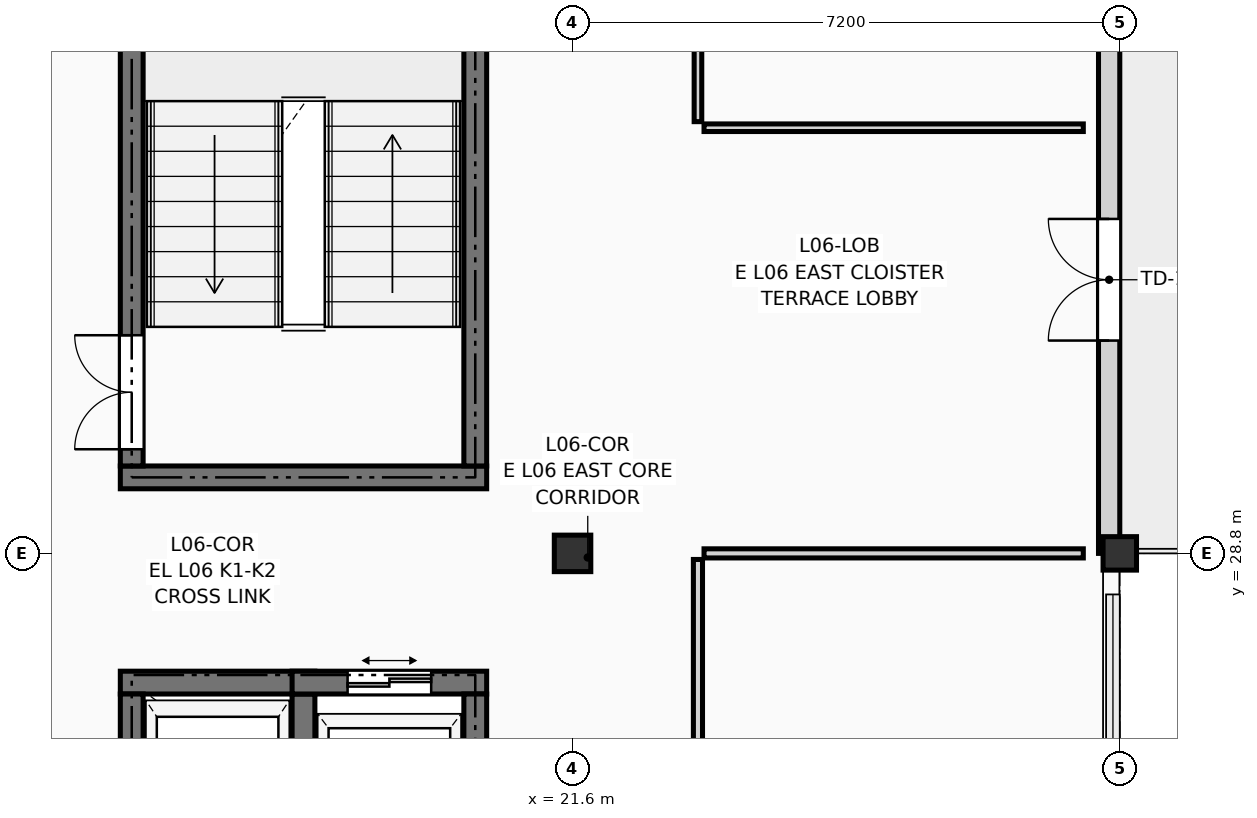
"""IFC4 building model, lengths in metres.
Left out: names, types, materials, properties, quantities, classifications, styles, units other than length and angle.
Written with IfcOpenShell. Run it as: python <this file> out.ifc"""

import sys

from ifc_helpers import new_model, si_unit, direction, frame, frame_2d, origin, origin_2d, place, context, subcontext, project, spatial, rectangle, extrude, element, fill, save


model = new_model("IFC4")
c1 = context("Model", 3, precision=1e-05, world=origin(), true_north=direction((0.0, 1.0)))
c2 = subcontext(c1, "Body", "Model", "MODEL_VIEW")
j1 = project(units=[si_unit("LENGTHUNIT", "METRE"), si_unit("PLANEANGLEUNIT", "RADIAN")], contexts=[c1])
p1 = place(None, origin())
s1 = spatial("IfcSite", under=j1, at=p1, CompositionType="ELEMENT")
p2 = place(p1, origin())
s2 = spatial("IfcBuilding", under=s1, at=p2, CompositionType="ELEMENT")
p3 = place(p2, frame((0.0, 0.0, 22.95)))
s3 = spatial("IfcBuildingStorey", under=s2, at=p3, CompositionType="ELEMENT", Elevation=22.95)
p4 = place(p3, frame((21.6, 28.8, 0.0), z_axis=(0.0, 0.0, 1.0), x_axis=(1.0, 0.0, 0.0)))
e1 = element("IfcColumn", 1, at=p4, inside=s3, PredefinedType="COLUMN", context=c2, shape_type="SweptSolid", body=[
    extrude(rectangle(XDim=0.48, YDim=0.48, at=origin_2d()), origin(), (0.0, 0.0, 1.0), 3.3),
])
p5 = place(p3, frame((28.8, 28.8, 0.0), z_axis=(0.0, 0.0, 1.0), x_axis=(1.0, 0.0, 0.0)))
e2 = element("IfcColumn", 2, at=p5, inside=s3, PredefinedType="COLUMN", context=c2, shape_type="SweptSolid", body=[
    extrude(rectangle(XDim=0.44, YDim=0.44, at=origin_2d()), origin(), (0.0, 0.0, 1.0), 3.3),
])
p6 = place(p3, frame((28.66, 28.8, 0.0), z_axis=(0.0, 0.0, 1.0), x_axis=(0.0, 1.0, 0.0)))
e3 = element("IfcWall", 3, at=p6, inside=s3, PredefinedType="SOLIDWALL", context=c2, shape_type="SweptSolid", body=[
    extrude(rectangle(XDim=7.2, YDim=0.28, at=frame_2d((3.6, 0.0))), origin(), (0.0, 0.0, 1.0), 2.54),
])
p7 = place(p6, frame((2.8, 0.0, 0.0)))
e4 = element("IfcOpeningElement", 4, at=p7, cuts=e3, PredefinedType="OPENING", context=c2, shape_type="SweptSolid", body=[
    extrude(rectangle(XDim=1.6, YDim=2.25, at=frame_2d((0.8, 1.125))), frame((0.0, 0.152, 0.0), z_axis=(0.0, -1.0, 0.0), x_axis=(1.0, 0.0, 0.0)), (0.0, 0.0, 1.0), 0.304),
])
p8 = place(p3, frame((15.65, 29.8, 0.0), z_axis=(0.0, 0.0, 1.0), x_axis=(1.0, 0.0, 0.0)))
e5 = element("IfcWall", 5, at=p8, inside=s3, PredefinedType="SHEAR", context=c2, shape_type="SweptSolid", body=[
    extrude(rectangle(XDim=4.82, YDim=0.3, at=frame_2d((2.41, 0.0))), origin(), (0.0, 0.0, 1.0), 3.09),
])
p9 = place(p3, frame((15.8, 29.95, 0.0), z_axis=(0.0, 0.0, 1.0), x_axis=(0.0, 1.0, 0.0)))
e6 = element("IfcWall", 6, at=p9, inside=s3, PredefinedType="SHEAR", context=c2, shape_type="SweptSolid", body=[
    extrude(rectangle(XDim=7.7, YDim=0.3, at=frame_2d((3.85, 0.0))), origin(), (0.0, 0.0, 1.0), 3.09),
])
p10 = place(p9, frame((0.22, 0.0, 0.0)))
e7 = element("IfcOpeningElement", 7, at=p10, cuts=e6, PredefinedType="OPENING", context=c2, shape_type="SweptSolid", body=[
    extrude(rectangle(XDim=1.5, YDim=2.2, at=frame_2d((0.75, 1.1))), frame((0.0, 0.162, 0.0), z_axis=(0.0, -1.0, 0.0), x_axis=(1.0, 0.0, 0.0)), (0.0, 0.0, 1.0), 0.324),
])
p11 = place(p3, frame((20.32, 29.95, 0.0), z_axis=(0.0, 0.0, 1.0), x_axis=(0.0, 1.0, 0.0)))
e8 = element("IfcWall", 8, at=p11, inside=s3, PredefinedType="SHEAR", context=c2, shape_type="SweptSolid", body=[
    extrude(rectangle(XDim=7.7, YDim=0.3, at=frame_2d((3.85, 0.0))), origin(), (0.0, 0.0, 1.0), 3.09),
])
p12 = place(p3, frame((15.65, 27.1, 0.0), z_axis=(0.0, 0.0, 1.0), x_axis=(1.0, 0.0, 0.0)))
e9 = element("IfcWall", 9, at=p12, inside=s3, PredefinedType="SHEAR", context=c2, shape_type="SweptSolid", body=[
    extrude(rectangle(XDim=2.56, YDim=0.3, at=frame_2d((1.28, 0.0))), origin(), (0.0, 0.0, 1.0), 3.09),
])
p13 = place(p3, frame((15.8, 23.98, 0.0), z_axis=(0.0, 0.0, 1.0), x_axis=(0.0, 1.0, 0.0)))
e10 = element("IfcWall", 10, at=p13, inside=s3, PredefinedType="SHEAR", context=c2, shape_type="SweptSolid", body=[
    extrude(rectangle(XDim=2.97, YDim=0.3, at=frame_2d((1.485, 0.0))), origin(), (0.0, 0.0, 1.0), 3.09),
])
p14 = place(p13, frame((0.835, 0.0, 0.0)))
e11 = element("IfcOpeningElement", 11, at=p14, cuts=e10, PredefinedType="OPENING", context=c2, shape_type="SweptSolid", body=[
    extrude(rectangle(XDim=1.3, YDim=2.25, at=frame_2d((0.65, 1.125))), frame((0.0, 0.162, 0.0), z_axis=(0.0, -1.0, 0.0), x_axis=(1.0, 0.0, 0.0)), (0.0, 0.0, 1.0), 0.324),
])
p15 = place(p3, frame((18.06, 23.98, 0.0), z_axis=(0.0, 0.0, 1.0), x_axis=(0.0, 1.0, 0.0)))
e12 = element("IfcWall", 12, at=p15, inside=s3, PredefinedType="SHEAR", context=c2, shape_type="SweptSolid", body=[
    extrude(rectangle(XDim=2.97, YDim=0.3, at=frame_2d((1.485, 0.0))), origin(), (0.0, 0.0, 1.0), 3.09),
])
p16 = place(p3, frame((17.91, 27.1, 0.0), z_axis=(0.0, 0.0, 1.0), x_axis=(1.0, 0.0, 0.0)))
e13 = element("IfcWall", 13, at=p16, inside=s3, PredefinedType="SHEAR", context=c2, shape_type="SweptSolid", body=[
    extrude(rectangle(XDim=2.56, YDim=0.3, at=frame_2d((1.28, 0.0))), origin(), (0.0, 0.0, 1.0), 3.09),
])
p17 = place(p16, frame((0.73, 0.0, 0.0)))
e14 = element("IfcOpeningElement", 14, at=p17, cuts=e13, PredefinedType="OPENING", context=c2, shape_type="SweptSolid", body=[
    extrude(rectangle(XDim=1.1, YDim=2.2, at=frame_2d((0.55, 1.1))), frame((0.0, 0.162, 0.0), z_axis=(0.0, -1.0, 0.0), x_axis=(1.0, 0.0, 0.0)), (0.0, 0.0, 1.0), 0.324),
])
p18 = place(p3, frame((20.32, 23.98, 0.0), z_axis=(0.0, 0.0, 1.0), x_axis=(0.0, 1.0, 0.0)))
e15 = element("IfcWall", 15, at=p18, inside=s3, PredefinedType="SHEAR", context=c2, shape_type="SweptSolid", body=[
    extrude(rectangle(XDim=2.97, YDim=0.3, at=frame_2d((1.485, 0.0))), origin(), (0.0, 0.0, 1.0), 3.09),
])
p19 = place(p3, frame((23.25, 14.88, 0.0), z_axis=(0.0, 0.0, 1.0), x_axis=(0.0, 1.0, 0.0)))
e16 = element("IfcWall", 16, at=p19, inside=s3, PredefinedType="PARTITIONING", context=c2, shape_type="SweptSolid", body=[
    extrude(rectangle(XDim=13.84, YDim=0.12, at=frame_2d((6.92, 0.0))), origin(), (0.0, 0.0, 1.0), 3.075),
])
p20 = place(p19, frame((8.387, 0.0, 0.0)))
e17 = element("IfcOpeningElement", 17, at=p20, cuts=e16, PredefinedType="OPENING", context=c2, shape_type="SweptSolid", body=[
    extrude(rectangle(XDim=1.15, YDim=2.18, at=frame_2d((0.575, 1.09))), frame((0.0, 0.072, 0.0), z_axis=(0.0, -1.0, 0.0), x_axis=(1.0, 0.0, 0.0)), (0.0, 0.0, 1.0), 0.144),
])
p21 = place(p3, frame((23.33, 28.8, 0.0), z_axis=(0.0, 0.0, 1.0), x_axis=(1.0, 0.0, 0.0)))
e18 = element("IfcWall", 18, at=p21, inside=s3, PredefinedType="PARTITIONING", context=c2, shape_type="SweptSolid", body=[
    extrude(rectangle(XDim=4.99, YDim=0.12, at=frame_2d((2.495, 0.0))), origin(), (0.0, 0.0, 1.0), 2.415),
])
p22 = place(p3, frame((23.25, 34.48, 0.0), z_axis=(0.0, 0.0, 1.0), x_axis=(0.0, 1.0, 0.0)))
e19 = element("IfcWall", 19, at=p22, inside=s3, PredefinedType="PARTITIONING", context=c2, shape_type="SweptSolid", body=[
    extrude(rectangle(XDim=7.84, YDim=0.1, at=frame_2d((3.92, 0.0))), origin(), (0.0, 0.0, 1.0), 3.075),
])
p23 = place(p22, frame((3.47, 0.0, 0.0)))
e20 = element("IfcOpeningElement", 20, at=p23, cuts=e19, PredefinedType="OPENING", context=c2, shape_type="SweptSolid", body=[
    extrude(rectangle(XDim=0.9, YDim=2.1, at=frame_2d((0.45, 1.05))), frame((0.0, 0.062, 0.0), z_axis=(0.0, -1.0, 0.0), x_axis=(1.0, 0.0, 0.0)), (0.0, 0.0, 1.0), 0.124),
])
p24 = place(p3, frame((23.33, 34.4, 0.0), z_axis=(0.0, 0.0, 1.0), x_axis=(1.0, 0.0, 0.0)))
e21 = element("IfcWall", 21, at=p24, inside=s3, PredefinedType="PARTITIONING", context=c2, shape_type="SweptSolid", body=[
    extrude(rectangle(XDim=4.99, YDim=0.1, at=frame_2d((2.495, 0.0))), origin(), (0.0, 0.0, 1.0), 3.075),
])
p25 = place(p7, origin())
e22 = element("IfcDoor", 22, at=p25, inside=s3, OperationType="DOUBLE_DOOR_SINGLE_SWING", PredefinedType="DOOR", context=c2, shape_type="SweptSolid", body=[
    extrude(rectangle(XDim=1.6, YDim=2.25, at=frame_2d((0.8, 1.125))), frame((0.0, 0.025, 0.0), z_axis=(0.0, -1.0, 0.0), x_axis=(1.0, 0.0, 0.0)), (0.0, 0.0, 1.0), 0.05),
])
fill(e4, e22)
p26 = place(p10, origin())
e23 = element("IfcDoor", 23, at=p26, inside=s3, OperationType="DOUBLE_DOOR_SINGLE_SWING", PredefinedType="DOOR", context=c2, shape_type="SweptSolid", body=[
    extrude(rectangle(XDim=1.5, YDim=2.2, at=frame_2d((0.75, 1.1))), frame((0.0, 0.025, 0.0), z_axis=(0.0, -1.0, 0.0), x_axis=(1.0, 0.0, 0.0)), (0.0, 0.0, 1.0), 0.05),
])
fill(e7, e23)
p27 = place(p17, origin())
e24 = element("IfcDoor", 24, at=p27, inside=s3, OperationType="DOUBLE_DOOR_SLIDING", PredefinedType="DOOR", context=c2, shape_type="SweptSolid", body=[
    extrude(rectangle(XDim=1.1, YDim=2.2, at=frame_2d((0.55, 1.1))), frame((0.0, 0.025, 0.0), z_axis=(0.0, -1.0, 0.0), x_axis=(1.0, 0.0, 0.0)), (0.0, 0.0, 1.0), 0.05),
])
fill(e14, e24)
save(model, sys.argv[1])
